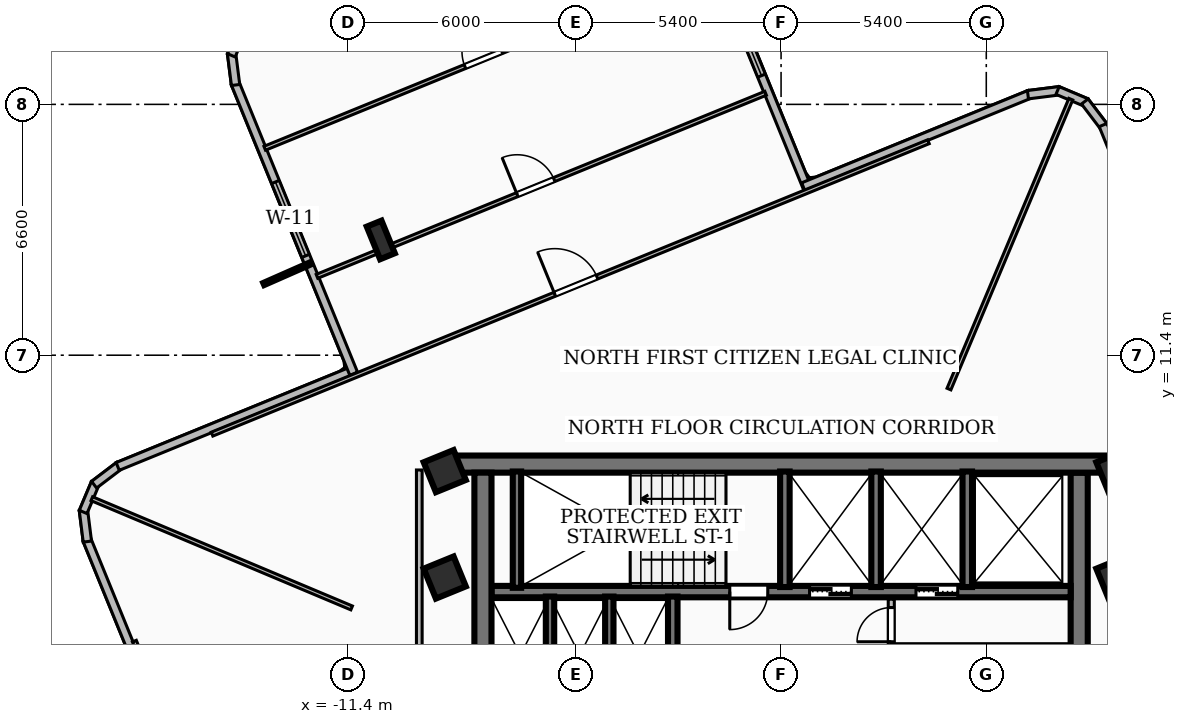
"""IFC4 building model, lengths in metres.
Left out: names, types, materials, properties, quantities, classifications, styles, units other than length and angle.
Written with IfcOpenShell. Run it as: python <this file> out.ifc"""

import sys

from ifc_helpers import new_model, si_unit, direction, frame, frame_2d, origin, origin_2d, place, context, subcontext, project, spatial, rectangle, i_section, extrude, element, fill, save


model = new_model("IFC4")
c1 = context("Model", 3, precision=1e-05, world=origin(), true_north=direction((0.0, 1.0)))
c2 = subcontext(c1, "Body", "Model", "MODEL_VIEW")
j1 = project(units=[si_unit("LENGTHUNIT", "METRE"), si_unit("PLANEANGLEUNIT", "RADIAN")], contexts=[c1])
p1 = place(None, origin())
s1 = spatial("IfcSite", under=j1, at=p1, CompositionType="ELEMENT")
p2 = place(p1, origin())
s2 = spatial("IfcBuilding", under=s1, at=p2, CompositionType="ELEMENT")
p3 = place(p2, frame((0.0, 0.0, 177.48)))
s3 = spatial("IfcBuildingStorey", under=s2, at=p3, CompositionType="ELEMENT", Elevation=177.48)
p4 = place(p3, frame((-8.78, 8.535, 0.0), z_axis=(0.0, 0.0, 1.0), x_axis=(1.0, 0.0, 0.0)))
e1 = element("IfcWall", 1, at=p4, inside=s3, PredefinedType="SHEAR", context=c2, shape_type="SweptSolid", body=[
    extrude(rectangle(XDim=17.56, YDim=0.45, at=frame_2d((8.78, 0.0))), origin(), (0.0, 0.0, 1.0), 3.34),
])
for number, where, z_axis, x_axis in (
    (2, (-7.845, 1.975, 0.0), (0.0, 0.0, 1.0), (0.0, 1.0, 0.0)),
    (3, (7.845, 8.31, 0.0), (0.0, 0.0, 1.0), (0.0, -1.0, 0.0)),
):
    element("IfcWall", number, at=place(p3, frame(where, z_axis=z_axis, x_axis=x_axis)), inside=s3, PredefinedType="SHEAR", context=c2, shape_type="SweptSolid", body=[
        extrude(rectangle(XDim=6.335, YDim=0.45, at=frame_2d((3.167, 0.0))), origin(), (0.0, 0.0, 1.0), 3.34),
    ])
p5 = place(p3, frame((7.62, 5.18, 0.0), z_axis=(0.0, 0.0, 1.0), x_axis=(-1.0, 0.0, 0.0)))
e4 = element("IfcWall", 4, at=p5, inside=s3, PredefinedType="SOLIDWALL", context=c2, shape_type="SweptSolid", body=[
    extrude(rectangle(XDim=15.24, YDim=0.3, at=frame_2d((7.62, 0.0))), origin(), (0.0, 0.0, 1.0), 3.34),
])
p6 = place(p5, frame((5.77, 0.0, 0.0)))
e5 = element("IfcOpeningElement", 5, at=p6, cuts=e4, PredefinedType="OPENING", context=c2, shape_type="SweptSolid", body=[
    extrude(rectangle(XDim=1.1, YDim=2.15, at=frame_2d((0.55, 1.075))), frame((0.0, 0.16, 0.0), z_axis=(0.0, -1.0, 0.0), x_axis=(1.0, 0.0, 0.0)), (0.0, 0.0, 1.0), 0.32),
])
p7 = place(p5, frame((2.97, 0.0, 0.0)))
e6 = element("IfcOpeningElement", 6, at=p7, cuts=e4, PredefinedType="OPENING", context=c2, shape_type="SweptSolid", body=[
    extrude(rectangle(XDim=1.1, YDim=2.15, at=frame_2d((0.55, 1.075))), frame((0.0, 0.16, 0.0), z_axis=(0.0, -1.0, 0.0), x_axis=(1.0, 0.0, 0.0)), (0.0, 0.0, 1.0), 0.32),
])
p8 = place(p5, frame((7.97, 0.0, 0.0)))
e7 = element("IfcOpeningElement", 7, at=p8, cuts=e4, PredefinedType="OPENING", context=c2, shape_type="SweptSolid", body=[
    extrude(rectangle(XDim=1.0, YDim=2.1, at=frame_2d((0.5, 1.05))), frame((0.0, 0.16, 0.0), z_axis=(0.0, -1.0, 0.0), x_axis=(1.0, 0.0, 0.0)), (0.0, 0.0, 1.0), 0.32),
])
p9 = place(p3, frame((-6.95, 5.28, 0.0), z_axis=(0.0, 0.0, 1.0), x_axis=(0.0, 1.0, 0.0)))
e8 = element("IfcWall", 8, at=p9, inside=s3, PredefinedType="SOLIDWALL", context=c2, shape_type="SweptSolid", body=[
    extrude(rectangle(XDim=3.06, YDim=0.22, at=frame_2d((1.53, 0.0))), origin(), (0.0, 0.0, 1.0), 3.34),
])
for number, where, z_axis, x_axis in (
    (9, (0.1, 5.3, 0.0), (0.0, 0.0, 1.0), (0.0, 1.0, 0.0)),
    (10, (2.5, 5.3, 0.0), (0.0, 0.0, 1.0), (0.0, 1.0, 0.0)),
    (11, (4.9, 5.3, 0.0), (0.0, 0.0, 1.0), (0.0, 1.0, 0.0)),
):
    element("IfcWall", number, at=place(p3, frame(where, z_axis=z_axis, x_axis=x_axis)), inside=s3, PredefinedType="SOLIDWALL", context=c2, shape_type="SweptSolid", body=[
        extrude(rectangle(XDim=3.04, YDim=0.25, at=frame_2d((1.52, 0.0))), origin(), (0.0, 0.0, 1.0), 3.34),
    ])
p10 = place(p3, frame((-2.85, 1.98, 0.0), z_axis=(0.0, 0.0, 1.0), x_axis=(0.0, 1.0, 0.0)))
e12 = element("IfcWall", 12, at=p10, inside=s3, PredefinedType="SOLIDWALL", context=c2, shape_type="SweptSolid", body=[
    extrude(rectangle(XDim=3.07, YDim=0.25, at=frame_2d((1.535, 0.0))), origin(), (0.0, 0.0, 1.0), 3.34),
])
for number, where, z_axis, x_axis in (
    (13, (-6.08, 1.98, 0.0), (0.0, 0.0, 1.0), (0.0, 1.0, 0.0)),
    (14, (-4.52, 1.98, 0.0), (0.0, 0.0, 1.0), (0.0, 1.0, 0.0)),
):
    element("IfcWall", number, at=place(p3, frame(where, z_axis=z_axis, x_axis=x_axis)), inside=s3, PredefinedType="SOLIDWALL", context=c2, shape_type="SweptSolid", body=[
        extrude(rectangle(XDim=3.07, YDim=0.22, at=frame_2d((1.535, 0.0))), origin(), (0.0, 0.0, 1.0), 3.34),
    ])
for number, where, z_axis, x_axis in (
    (15, (-8.85, 5.55, 0.0), (0.0, 0.0, 1.0), (0.926, 0.378, 0.0)),
    (16, (8.85, 5.55, 0.0), (0.0, 0.0, 1.0), (0.926, 0.378, 0.0)),
    (17, (-8.85, 8.35, 0.0), (0.0, 0.0, 1.0), (0.926, 0.378, 0.0)),
    (18, (8.85, 8.35, 0.0), (0.0, 0.0, 1.0), (0.926, 0.378, 0.0)),
):
    element("IfcColumn", number, at=place(p3, frame(where, z_axis=z_axis, x_axis=x_axis)), inside=s3, PredefinedType="COLUMN", context=c2, shape_type="SweptSolid", body=[
        extrude(rectangle(XDim=0.85, YDim=0.85, at=origin_2d()), origin(), (0.0, 0.0, 1.0), 3.6),
    ])
p11 = place(p3, frame((-10.533, 14.433, 0.0), z_axis=(0.0, 0.0, 1.0), x_axis=(0.92587058481, 0.377840786818, 0.0)))
e19 = element("IfcColumn", 19, at=p11, inside=s3, PredefinedType="COLUMN", context=c2, shape_type="SweptSolid", body=[
    extrude(i_section(OverallWidth=0.418, OverallDepth=0.927, WebThickness=0.019, FlangeThickness=0.032, at=origin_2d()), origin(), (0.0, 0.0, 1.0), 3.6),
])
p12 = place(p3, frame((-15.834, 0.583, 0.0), z_axis=(0.0, 0.0, 1.0), x_axis=(-0.377776256629, 0.925896916469, 0.0)))
e20 = element("IfcWall", 20, at=p12, inside=s3, PredefinedType="SOLIDWALL", context=c2, shape_type="SweptSolid", body=[
    extrude(rectangle(XDim=6.438, YDim=0.22, at=frame_2d((3.219, 0.0))), origin(), (0.0, 0.0, 1.0), 3.34),
])
p13 = place(p3, frame((-18.254, 6.496, 0.0), z_axis=(0.0, 0.0, 1.0), x_axis=(-0.124646916858, 0.992201162123, 0.0)))
e21 = element("IfcWall", 21, at=p13, inside=s3, PredefinedType="SOLIDWALL", context=c2, shape_type="SweptSolid", body=[
    extrude(rectangle(XDim=0.834, YDim=0.22, at=frame_2d((0.417, 0.0))), origin(), (0.0, 0.0, 1.0), 3.34),
])
p14 = place(p3, frame((-18.365, 7.276, 0.0), z_axis=(0.0, 0.0, 1.0), x_axis=(0.387977068381, 0.9216690265, 0.0)))
e22 = element("IfcWall", 22, at=p14, inside=s3, PredefinedType="SOLIDWALL", context=c2, shape_type="SweptSolid", body=[
    extrude(rectangle(XDim=0.819, YDim=0.22, at=frame_2d((0.41, 0.0))), origin(), (0.0, 0.0, 1.0), 3.34),
])
p15 = place(p3, frame((-18.077, 7.993, 0.0), z_axis=(0.0, 0.0, 1.0), x_axis=(0.796365329878, 0.604815890473, 0.0)))
e23 = element("IfcWall", 23, at=p15, inside=s3, PredefinedType="SOLIDWALL", context=c2, shape_type="SweptSolid", body=[
    extrude(rectangle(XDim=0.833, YDim=0.22, at=frame_2d((0.417, 0.0))), origin(), (0.0, 0.0, 1.0), 3.34),
])
p16 = place(p3, frame((-17.456, 8.473, 0.0), z_axis=(0.0, 0.0, 1.0), x_axis=(0.925916493636, 0.377728271133, 0.0)))
e24 = element("IfcWall", 24, at=p16, inside=s3, PredefinedType="SOLIDWALL", context=c2, shape_type="SweptSolid", body=[
    extrude(rectangle(XDim=6.759, YDim=0.22, at=frame_2d((3.379, 0.0))), origin(), (0.0, 0.0, 1.0), 3.34),
])
p17 = place(p3, frame((-11.246, 10.912, 0.0), z_axis=(0.0, 0.0, 1.0), x_axis=(-0.37779924707, 0.92588753578, 0.0)))
e25 = element("IfcWall", 25, at=p17, inside=s3, PredefinedType="SOLIDWALL", context=c2, shape_type="SweptSolid", body=[
    extrude(rectangle(XDim=8.258, YDim=0.22, at=frame_2d((4.129, 0.0))), origin(), (0.0, 0.0, 1.0), 3.34),
])
p18 = place(p17, frame((3.35, 0.0, 0.85)))
e26 = element("IfcOpeningElement", 26, at=p18, cuts=e25, PredefinedType="OPENING", context=c2, shape_type="SweptSolid", body=[
    extrude(rectangle(XDim=2.1, YDim=1.6, at=frame_2d((1.05, 0.8))), frame((0.0, 0.12, 0.0), z_axis=(0.0, -1.0, 0.0), x_axis=(1.0, 0.0, 0.0)), (0.0, 0.0, 1.0), 0.24),
])
p19 = place(p3, frame((-14.354, 18.51, 0.0), z_axis=(0.0, 0.0, 1.0), x_axis=(-0.125798873345, 0.992055766308, 0.0)))
e27 = element("IfcWall", 27, at=p19, inside=s3, PredefinedType="SOLIDWALL", context=c2, shape_type="SweptSolid", body=[
    extrude(rectangle(XDim=0.834, YDim=0.22, at=frame_2d((0.417, 0.0))), origin(), (0.0, 0.0, 1.0), 3.34),
])
p20 = place(p3, frame((-14.466, 19.29, 0.0), z_axis=(0.0, 0.0, 1.0), x_axis=(0.388336782412, 0.92151752204, 0.0)))
e28 = element("IfcWall", 28, at=p20, inside=s3, PredefinedType="SOLIDWALL", context=c2, shape_type="SweptSolid", body=[
    extrude(rectangle(XDim=0.819, YDim=0.22, at=frame_2d((0.41, 0.0))), origin(), (0.0, 0.0, 1.0), 3.34),
])
p21 = place(p3, frame((-2.423, 23.432, 0.0), z_axis=(0.0, 0.0, 1.0), x_axis=(0.377824590968, -0.925877194049, 0.0)))
e29 = element("IfcWall", 29, at=p21, inside=s3, PredefinedType="SOLIDWALL", context=c2, shape_type="SweptSolid", body=[
    extrude(rectangle(XDim=8.258, YDim=0.22, at=frame_2d((4.129, 0.0))), origin(), (0.0, 0.0, 1.0), 3.34),
])
p22 = place(p21, frame((2.35, 0.0, 0.85)))
e30 = element("IfcOpeningElement", 30, at=p22, cuts=e29, PredefinedType="OPENING", context=c2, shape_type="SweptSolid", body=[
    extrude(rectangle(XDim=2.7, YDim=1.85, at=frame_2d((1.35, 0.925))), frame((0.0, 0.12, 0.0), z_axis=(0.0, -1.0, 0.0), x_axis=(1.0, 0.0, 0.0)), (0.0, 0.0, 1.0), 0.24),
])
p23 = place(p3, frame((0.583, 15.834, 0.0), z_axis=(0.0, 0.0, 1.0), x_axis=(0.925896916469, 0.377776256629, 0.0)))
e31 = element("IfcWall", 31, at=p23, inside=s3, PredefinedType="SOLIDWALL", context=c2, shape_type="SweptSolid", body=[
    extrude(rectangle(XDim=6.438, YDim=0.22, at=frame_2d((3.219, 0.0))), origin(), (0.0, 0.0, 1.0), 3.34),
])
p24 = place(p3, frame((6.496, 18.254, 0.0), z_axis=(0.0, 0.0, 1.0), x_axis=(0.992201162123, 0.124646916858, 0.0)))
e32 = element("IfcWall", 32, at=p24, inside=s3, PredefinedType="SOLIDWALL", context=c2, shape_type="SweptSolid", body=[
    extrude(rectangle(XDim=0.834, YDim=0.22, at=frame_2d((0.417, 0.0))), origin(), (0.0, 0.0, 1.0), 3.34),
])
p25 = place(p3, frame((7.276, 18.365, 0.0), z_axis=(0.0, 0.0, 1.0), x_axis=(0.9216690265, -0.387977068381, 0.0)))
e33 = element("IfcWall", 33, at=p25, inside=s3, PredefinedType="SOLIDWALL", context=c2, shape_type="SweptSolid", body=[
    extrude(rectangle(XDim=0.819, YDim=0.22, at=frame_2d((0.41, 0.0))), origin(), (0.0, 0.0, 1.0), 3.34),
])
p26 = place(p3, frame((7.993, 18.077, 0.0), z_axis=(0.0, 0.0, 1.0), x_axis=(0.604815890473, -0.796365329878, 0.0)))
e34 = element("IfcWall", 34, at=p26, inside=s3, PredefinedType="SOLIDWALL", context=c2, shape_type="SweptSolid", body=[
    extrude(rectangle(XDim=0.833, YDim=0.22, at=frame_2d((0.417, 0.0))), origin(), (0.0, 0.0, 1.0), 3.34),
])
p27 = place(p3, frame((8.473, 17.456, 0.0), z_axis=(0.0, 0.0, 1.0), x_axis=(0.377728271133, -0.925916493636, 0.0)))
e35 = element("IfcWall", 35, at=p27, inside=s3, PredefinedType="SOLIDWALL", context=c2, shape_type="SweptSolid", body=[
    extrude(rectangle(XDim=6.759, YDim=0.22, at=frame_2d((3.379, 0.0))), origin(), (0.0, 0.0, 1.0), 3.34),
])
p28 = place(p3, frame((2.9, 2.04, 0.0), z_axis=(0.0, 0.0, 1.0), x_axis=(0.0, 1.0, 0.0)))
e36 = element("IfcWall", 36, at=p28, inside=s3, PredefinedType="PARTITIONING", context=c2, shape_type="SweptSolid", body=[
    extrude(rectangle(XDim=2.94, YDim=0.16, at=frame_2d((1.47, 0.0))), origin(), (0.0, 0.0, 1.0), 2.57),
])
p29 = place(p28, frame((1.82, 0.0, 0.0)))
e37 = element("IfcOpeningElement", 37, at=p29, cuts=e36, PredefinedType="OPENING", context=c2, shape_type="SweptSolid", body=[
    extrude(rectangle(XDim=0.9, YDim=2.06, at=frame_2d((0.45, 1.03))), frame((0.0, 0.09, 0.0), z_axis=(0.0, -1.0, 0.0), x_axis=(1.0, 0.0, 0.0)), (0.0, 0.0, 1.0), 0.18),
])
p30 = place(p3, frame((2.9, 3.74, 0.0), z_axis=(0.0, 0.0, 1.0), x_axis=(1.0, 0.0, 0.0)))
e38 = element("IfcWall", 38, at=p30, inside=s3, PredefinedType="PARTITIONING", context=c2, shape_type="SweptSolid", body=[
    extrude(rectangle(XDim=4.65, YDim=0.138, at=frame_2d((2.325, 0.0))), origin(), (0.0, 0.0, 1.0), 3.34),
])
p31 = place(p3, frame((-9.52, 1.75, 0.0), z_axis=(0.0, 0.0, 1.0), x_axis=(0.0, 1.0, 0.0)))
e39 = element("IfcWall", 39, at=p31, inside=s3, PredefinedType="PARTITIONING", context=c2, shape_type="SweptSolid", body=[
    extrude(rectangle(XDim=6.63, YDim=0.15, at=frame_2d((3.315, 0.0))), origin(), (0.0, 0.0, 1.0), 3.34),
])
p32 = place(p3, frame((4.418, 10.509, 0.0), z_axis=(0.0, 0.0, 1.0), x_axis=(0.387471247296, 0.921881788799, 0.0)))
e40 = element("IfcWall", 40, at=p32, inside=s3, PredefinedType="PARTITIONING", context=c2, shape_type="SweptSolid", body=[
    extrude(rectangle(XDim=8.274, YDim=0.11, at=frame_2d((4.137, 0.0))), origin(), (0.0, 0.0, 1.0), 3.34),
])
p33 = place(p3, frame((-11.3, 4.75, 0.0), z_axis=(0.0, 0.0, 1.0), x_axis=(-0.92186077199, 0.387521247245, 0.0)))
e41 = element("IfcWall", 41, at=p33, inside=s3, PredefinedType="PARTITIONING", context=c2, shape_type="SweptSolid", body=[
    extrude(rectangle(XDim=7.417, YDim=0.11, at=frame_2d((3.708, 0.0))), origin(), (0.0, 0.0, 1.0), 3.34),
])
p34 = place(p3, frame((-14.973, 9.323, 0.0), z_axis=(0.0, 0.0, 1.0), x_axis=(0.92584978414, 0.377891753295, 0.0)))
e42 = element("IfcWall", 42, at=p34, inside=s3, PredefinedType="PARTITIONING", context=c2, shape_type="SweptSolid", body=[
    extrude(rectangle(XDim=20.361, YDim=0.11, at=frame_2d((10.18, 0.0))), origin(), (0.0, 0.0, 1.0), 2.644),
])
p35 = place(p34, frame((9.741, 0.0, 0.0)))
e43 = element("IfcOpeningElement", 43, at=p35, cuts=e42, PredefinedType="OPENING", context=c2, shape_type="SweptSolid", body=[
    extrude(rectangle(XDim=1.2, YDim=2.1, at=frame_2d((0.6, 1.05))), frame((0.0, 0.065, 0.0), z_axis=(0.0, -1.0, 0.0), x_axis=(1.0, 0.0, 0.0)), (0.0, 0.0, 1.0), 0.13),
])
p36 = place(p3, frame((-12.212, 13.475, 0.0), z_axis=(0.0, 0.0, 1.0), x_axis=(0.925887289182, 0.377799851417, 0.0)))
e44 = element("IfcWall", 44, at=p36, inside=s3, PredefinedType="PARTITIONING", context=c2, shape_type="SweptSolid", body=[
    extrude(rectangle(XDim=12.75, YDim=0.11, at=frame_2d((6.375, 0.0))), origin(), (0.0, 0.0, 1.0), 2.644),
])
p37 = place(p36, frame((5.69, 0.0, 0.0)))
e45 = element("IfcOpeningElement", 45, at=p37, cuts=e44, PredefinedType="OPENING", context=c2, shape_type="SweptSolid", body=[
    extrude(rectangle(XDim=1.05, YDim=2.08, at=frame_2d((0.525, 1.04))), frame((0.0, 0.065, 0.0), z_axis=(0.0, -1.0, 0.0), x_axis=(1.0, 0.0, 0.0)), (0.0, 0.0, 1.0), 0.13),
])
p38 = place(p3, frame((-13.587, 16.845, 0.0), z_axis=(0.0, 0.0, 1.0), x_axis=(0.925853796027, 0.377881923864, 0.0)))
e46 = element("IfcWall", 46, at=p38, inside=s3, PredefinedType="PARTITIONING", context=c2, shape_type="SweptSolid", body=[
    extrude(rectangle(XDim=12.75, YDim=0.11, at=frame_2d((6.375, 0.0))), origin(), (0.0, 0.0, 1.0), 3.34),
])
p39 = place(p38, frame((5.69, 0.0, 0.0)))
e47 = element("IfcOpeningElement", 47, at=p39, cuts=e46, PredefinedType="OPENING", context=c2, shape_type="SweptSolid", body=[
    extrude(rectangle(XDim=1.05, YDim=2.08, at=frame_2d((0.525, 1.04))), frame((0.0, 0.065, 0.0), z_axis=(0.0, -1.0, 0.0), x_axis=(1.0, 0.0, 0.0)), (0.0, 0.0, 1.0), 0.13),
])
p40 = place(p3, frame((-9.323, -14.973, 0.0), z_axis=(0.0, 0.0, 1.0), x_axis=(-0.377891753295, 0.92584978414, 0.0)))
e48 = element("IfcWall", 48, at=p40, inside=s3, PredefinedType="PARTITIONING", context=c2, shape_type="SweptSolid", body=[
    extrude(rectangle(XDim=20.361, YDim=0.11, at=frame_2d((10.18, 0.0))), origin(), (0.0, 0.0, 1.0), 2.644),
])
p41 = place(p40, frame((9.741, 0.0, 0.0)))
e49 = element("IfcOpeningElement", 49, at=p41, cuts=e48, PredefinedType="OPENING", context=c2, shape_type="SweptSolid", body=[
    extrude(rectangle(XDim=1.2, YDim=2.1, at=frame_2d((0.6, 1.05))), frame((0.0, 0.065, 0.0), z_axis=(0.0, -1.0, 0.0), x_axis=(1.0, 0.0, 0.0)), (0.0, 0.0, 1.0), 0.13),
])
p42 = place(p18, origin())
e50 = element("IfcWindow", 50, at=p42, inside=s3, PartitioningType="SINGLE_PANEL", PredefinedType="WINDOW", context=c2, shape_type="SweptSolid", body=[
    extrude(rectangle(XDim=2.1, YDim=1.6, at=frame_2d((1.05, 0.8))), frame((0.0, 0.03, 0.0), z_axis=(0.0, -1.0, 0.0), x_axis=(1.0, 0.0, 0.0)), (0.0, 0.0, 1.0), 0.06),
])
fill(e26, e50)
p43 = place(p22, origin())
e51 = element("IfcWindow", 51, at=p43, inside=s3, PartitioningType="SINGLE_PANEL", PredefinedType="WINDOW", context=c2, shape_type="SweptSolid", body=[
    extrude(rectangle(XDim=2.7, YDim=1.85, at=frame_2d((1.35, 0.925))), frame((0.0, 0.03, 0.0), z_axis=(0.0, -1.0, 0.0), x_axis=(1.0, 0.0, 0.0)), (0.0, 0.0, 1.0), 0.06),
])
fill(e30, e51)
p44 = place(p6, origin())
e52 = element("IfcDoor", 52, at=p44, inside=s3, OperationType="DOUBLE_DOOR_SLIDING", PredefinedType="DOOR", context=c2, shape_type="SweptSolid", body=[
    extrude(rectangle(XDim=1.1, YDim=2.15, at=frame_2d((0.55, 1.075))), frame((0.0, 0.025, 0.0), z_axis=(0.0, -1.0, 0.0), x_axis=(1.0, 0.0, 0.0)), (0.0, 0.0, 1.0), 0.05),
])
fill(e5, e52)
p45 = place(p7, origin())
e53 = element("IfcDoor", 53, at=p45, inside=s3, OperationType="DOUBLE_DOOR_SLIDING", PredefinedType="DOOR", context=c2, shape_type="SweptSolid", body=[
    extrude(rectangle(XDim=1.1, YDim=2.15, at=frame_2d((0.55, 1.075))), frame((0.0, 0.025, 0.0), z_axis=(0.0, -1.0, 0.0), x_axis=(1.0, 0.0, 0.0)), (0.0, 0.0, 1.0), 0.05),
])
fill(e6, e53)
p46 = place(p8, origin())
e54 = element("IfcDoor", 54, at=p46, inside=s3, OperationType="SINGLE_SWING_RIGHT", PredefinedType="DOOR", context=c2, shape_type="SweptSolid", body=[
    extrude(rectangle(XDim=1.0, YDim=2.1, at=frame_2d((0.5, 1.05))), frame((0.0, 0.025, 0.0), z_axis=(0.0, -1.0, 0.0), x_axis=(1.0, 0.0, 0.0)), (0.0, 0.0, 1.0), 0.05),
])
fill(e7, e54)
p47 = place(p29, origin())
e55 = element("IfcDoor", 55, at=p47, inside=s3, OperationType="SINGLE_SWING_LEFT", PredefinedType="DOOR", context=c2, shape_type="SweptSolid", body=[
    extrude(rectangle(XDim=0.9, YDim=2.06, at=frame_2d((0.45, 1.03))), frame((0.0, 0.025, 0.0), z_axis=(0.0, -1.0, 0.0), x_axis=(1.0, 0.0, 0.0)), (0.0, 0.0, 1.0), 0.05),
])
fill(e37, e55)
p48 = place(p35, origin())
e56 = element("IfcDoor", 56, at=p48, inside=s3, OperationType="SINGLE_SWING_LEFT", PredefinedType="DOOR", context=c2, shape_type="SweptSolid", body=[
    extrude(rectangle(XDim=1.2, YDim=2.1, at=frame_2d((0.6, 1.05))), frame((0.0, 0.025, 0.0), z_axis=(0.0, -1.0, 0.0), x_axis=(1.0, 0.0, 0.0)), (0.0, 0.0, 1.0), 0.05),
])
fill(e43, e56)
p49 = place(p37, origin())
e57 = element("IfcDoor", 57, at=p49, inside=s3, OperationType="SINGLE_SWING_LEFT", PredefinedType="DOOR", context=c2, shape_type="SweptSolid", body=[
    extrude(rectangle(XDim=1.05, YDim=2.08, at=frame_2d((0.525, 1.04))), frame((0.0, 0.025, 0.0), z_axis=(0.0, -1.0, 0.0), x_axis=(1.0, 0.0, 0.0)), (0.0, 0.0, 1.0), 0.05),
])
fill(e45, e57)
p50 = place(p39, origin())
e58 = element("IfcDoor", 58, at=p50, inside=s3, OperationType="SINGLE_SWING_RIGHT", PredefinedType="DOOR", context=c2, shape_type="SweptSolid", body=[
    extrude(rectangle(XDim=1.05, YDim=2.08, at=frame_2d((0.525, 1.04))), frame((0.0, 0.025, 0.0), z_axis=(0.0, -1.0, 0.0), x_axis=(1.0, 0.0, 0.0)), (0.0, 0.0, 1.0), 0.05),
])
fill(e47, e58)
save(model, sys.argv[1])
